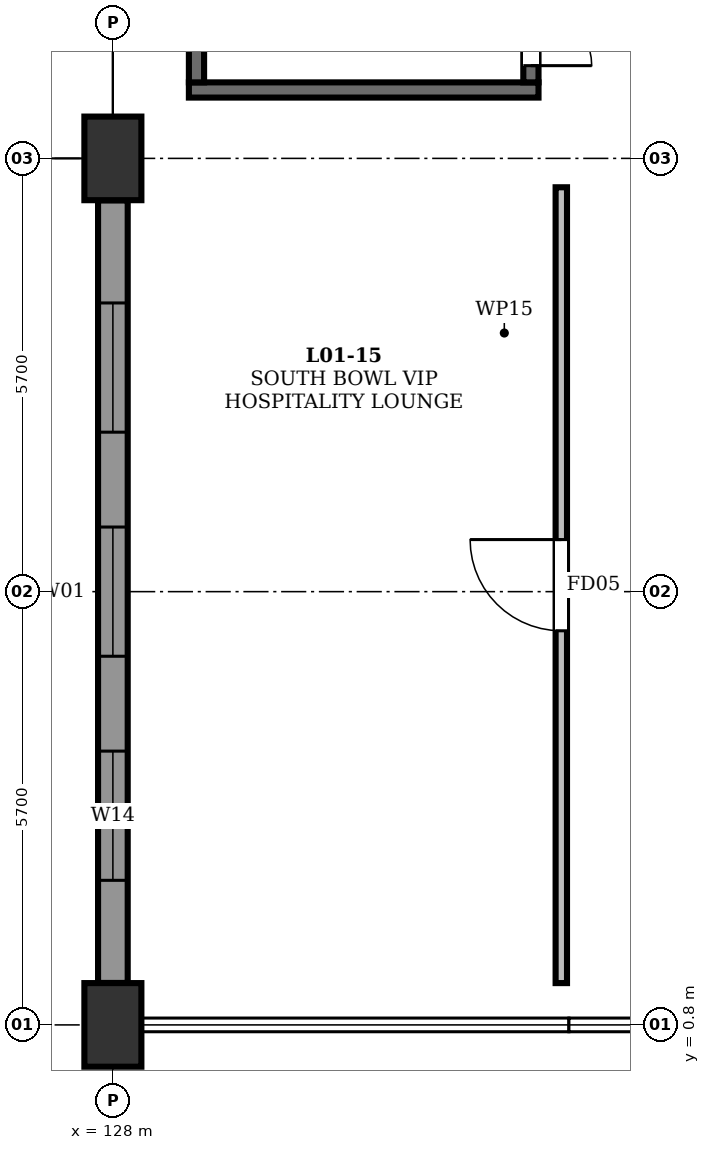
"""IFC4 building model, lengths in metres.
Left out: names, types, materials, properties, quantities, classifications, styles, units other than length and angle.
Written with IfcOpenShell. Run it as: python <this file> out.ifc"""

import sys

from ifc_helpers import new_model, si_unit, direction, frame, frame_2d, origin, origin_2d, place, context, subcontext, project, spatial, rectangle, extrude, element, fill, save


model = new_model("IFC4")
c1 = context("Model", 3, precision=1e-05, world=origin(), true_north=direction((0.0, 1.0)))
c2 = subcontext(c1, "Body", "Model", "MODEL_VIEW")
j1 = project(units=[si_unit("LENGTHUNIT", "METRE"), si_unit("PLANEANGLEUNIT", "RADIAN")], contexts=[c1])
p1 = place(None, origin())
s1 = spatial("IfcSite", under=j1, at=p1, CompositionType="ELEMENT")
p2 = place(p1, origin())
s2 = spatial("IfcBuilding", under=s1, at=p2, CompositionType="ELEMENT")
p3 = place(p2, frame((0.0, 0.0, 5.4)))
s3 = spatial("IfcBuildingStorey", under=s2, at=p3, CompositionType="ELEMENT", Elevation=5.4)
for number, where, z_axis, x_axis in (
    (1, (128.0, 0.8, 0.0), (0.0, 0.0, 1.0), (1.0, 0.0, 0.0)),
    (2, (128.0, 12.2, 0.0), (0.0, 0.0, 1.0), (1.0, 0.0, 0.0)),
):
    element("IfcColumn", number, at=place(p3, frame(where, z_axis=z_axis, x_axis=x_axis)), inside=s3, PredefinedType="COLUMN", context=c2, shape_type="SweptSolid", body=[
        extrude(rectangle(XDim=0.75, YDim=1.1, at=origin_2d()), origin(), (0.0, 0.0, 1.0), 4.8),
    ])
p4 = place(p3, frame((128.0, 1.352, 0.0), z_axis=(0.0, 0.0, 1.0), x_axis=(0.0, 1.0, 0.0)))
e3 = element("IfcWall", 3, at=p4, inside=s3, PredefinedType="STANDARD", context=c2, shape_type="SweptSolid", body=[
    extrude(rectangle(XDim=10.296, YDim=0.39, at=frame_2d((5.148, 0.0))), origin(), (0.0, 0.0, 1.0), 4.012),
])
p5 = place(p4, frame((1.35, 0.0, 0.75)))
e4 = element("IfcOpeningElement", 4, at=p5, cuts=e3, PredefinedType="OPENING", context=c2, shape_type="SweptSolid", body=[
    extrude(rectangle(XDim=1.7, YDim=1.25, at=frame_2d((0.85, 0.625))), frame((0.0, 0.207, 0.0), z_axis=(0.0, -1.0, 0.0), x_axis=(1.0, 0.0, 0.0)), (0.0, 0.0, 1.0), 0.414),
])
p6 = place(p4, frame((4.298, 0.0, 0.75)))
e5 = element("IfcOpeningElement", 5, at=p6, cuts=e3, PredefinedType="OPENING", context=c2, shape_type="SweptSolid", body=[
    extrude(rectangle(XDim=1.7, YDim=1.25, at=frame_2d((0.85, 0.625))), frame((0.0, 0.207, 0.0), z_axis=(0.0, -1.0, 0.0), x_axis=(1.0, 0.0, 0.0)), (0.0, 0.0, 1.0), 0.414),
])
p7 = place(p4, frame((7.246, 0.0, 0.75)))
e6 = element("IfcOpeningElement", 6, at=p7, cuts=e3, PredefinedType="OPENING", context=c2, shape_type="SweptSolid", body=[
    extrude(rectangle(XDim=1.7, YDim=1.25, at=frame_2d((0.85, 0.625))), frame((0.0, 0.207, 0.0), z_axis=(0.0, -1.0, 0.0), x_axis=(1.0, 0.0, 0.0)), (0.0, 0.0, 1.0), 0.414),
])
p8 = place(p3, frame((129.0, 13.1, 0.0), z_axis=(0.0, 0.0, 1.0), x_axis=(1.0, 0.0, 0.0)))
e7 = element("IfcWall", 7, at=p8, inside=s3, PredefinedType="SOLIDWALL", context=c2, shape_type="SweptSolid", body=[
    extrude(rectangle(XDim=4.6, YDim=0.2, at=frame_2d((2.3, 0.0))), origin(), (0.0, 0.0, 1.0), 4.56),
])
p9 = place(p3, frame((129.1, 13.2, 0.0), z_axis=(0.0, 0.0, 1.0), x_axis=(0.0, 1.0, 0.0)))
e8 = element("IfcWall", 8, at=p9, inside=s3, PredefinedType="SOLIDWALL", context=c2, shape_type="SweptSolid", body=[
    extrude(rectangle(XDim=8.8, YDim=0.2, at=frame_2d((4.4, 0.0))), origin(), (0.0, 0.0, 1.0), 4.56),
])
p10 = place(p3, frame((133.5, 13.2, 0.0), z_axis=(0.0, 0.0, 1.0), x_axis=(0.0, 1.0, 0.0)))
e9 = element("IfcWall", 9, at=p10, inside=s3, PredefinedType="SOLIDWALL", context=c2, shape_type="SweptSolid", body=[
    extrude(rectangle(XDim=8.8, YDim=0.2, at=frame_2d((4.4, 0.0))), origin(), (0.0, 0.0, 1.0), 4.56),
])
p11 = place(p10, frame((0.22, 0.0, 0.0)))
e10 = element("IfcOpeningElement", 10, at=p11, cuts=e9, PredefinedType="OPENING", context=c2, shape_type="SweptSolid", body=[
    extrude(rectangle(XDim=1.6, YDim=2.2, at=frame_2d((0.8, 1.1))), frame((0.0, 0.112, 0.0), z_axis=(0.0, -1.0, 0.0), x_axis=(1.0, 0.0, 0.0)), (0.0, 0.0, 1.0), 0.224),
])
p12 = place(p3, frame((133.9, 1.35, 0.0), z_axis=(0.0, 0.0, 1.0), x_axis=(0.0, 1.0, 0.0)))
e11 = element("IfcWall", 11, at=p12, inside=s3, PredefinedType="PARTITIONING", context=c2, shape_type="SweptSolid", body=[
    extrude(rectangle(XDim=10.47, YDim=0.15, at=frame_2d((5.235, 0.0))), origin(), (0.0, 0.0, 1.0), 4.56),
])
p13 = place(p12, frame((4.635, 0.0, 0.0)))
e12 = element("IfcOpeningElement", 12, at=p13, cuts=e11, PredefinedType="OPENING", context=c2, shape_type="SweptSolid", body=[
    extrude(rectangle(XDim=1.2, YDim=2.2, at=frame_2d((0.6, 1.1))), frame((0.0, 0.087, 0.0), z_axis=(0.0, -1.0, 0.0), x_axis=(1.0, 0.0, 0.0)), (0.0, 0.0, 1.0), 0.174),
])
p14 = place(p5, origin())
e13 = element("IfcWindow", 13, at=p14, inside=s3, PartitioningType="DOUBLE_PANEL_HORIZONTAL", PredefinedType="WINDOW", context=c2, shape_type="SweptSolid", body=[
    extrude(rectangle(XDim=1.7, YDim=1.25, at=frame_2d((0.85, 0.625))), frame((0.0, 0.08, 0.0), z_axis=(0.0, -1.0, 0.0), x_axis=(1.0, 0.0, 0.0)), (0.0, 0.0, 1.0), 0.06),
])
fill(e4, e13)
p15 = place(p6, origin())
e14 = element("IfcWindow", 14, at=p15, inside=s3, PartitioningType="DOUBLE_PANEL_HORIZONTAL", PredefinedType="WINDOW", context=c2, shape_type="SweptSolid", body=[
    extrude(rectangle(XDim=1.7, YDim=1.25, at=frame_2d((0.85, 0.625))), frame((0.0, 0.08, 0.0), z_axis=(0.0, -1.0, 0.0), x_axis=(1.0, 0.0, 0.0)), (0.0, 0.0, 1.0), 0.06),
])
fill(e5, e14)
p16 = place(p7, origin())
e15 = element("IfcWindow", 15, at=p16, inside=s3, PartitioningType="DOUBLE_PANEL_HORIZONTAL", PredefinedType="WINDOW", context=c2, shape_type="SweptSolid", body=[
    extrude(rectangle(XDim=1.7, YDim=1.25, at=frame_2d((0.85, 0.625))), frame((0.0, 0.08, 0.0), z_axis=(0.0, -1.0, 0.0), x_axis=(1.0, 0.0, 0.0)), (0.0, 0.0, 1.0), 0.06),
])
fill(e6, e15)
p17 = place(p11, frame((1.6, 0.0, 0.0), z_axis=(0.0, 0.0, 1.0), x_axis=(-1.0, 0.0, 0.0)))
e16 = element("IfcDoor", 16, at=p17, inside=s3, OperationType="DOUBLE_DOOR_SINGLE_SWING", PredefinedType="DOOR", context=c2, shape_type="SweptSolid", body=[
    extrude(rectangle(XDim=1.6, YDim=2.2, at=frame_2d((0.8, 1.1))), frame((0.0, 0.025, 0.0), z_axis=(0.0, -1.0, 0.0), x_axis=(1.0, 0.0, 0.0)), (0.0, 0.0, 1.0), 0.05),
])
fill(e10, e16)
p18 = place(p13, origin())
e17 = element("IfcDoor", 17, at=p18, inside=s3, OperationType="SINGLE_SWING_RIGHT", PredefinedType="DOOR", context=c2, shape_type="SweptSolid", body=[
    extrude(rectangle(XDim=1.2, YDim=2.2, at=frame_2d((0.6, 1.1))), frame((0.0, 0.025, 0.0), z_axis=(0.0, -1.0, 0.0), x_axis=(1.0, 0.0, 0.0)), (0.0, 0.0, 1.0), 0.05),
])
fill(e12, e17)
save(model, sys.argv[1])
